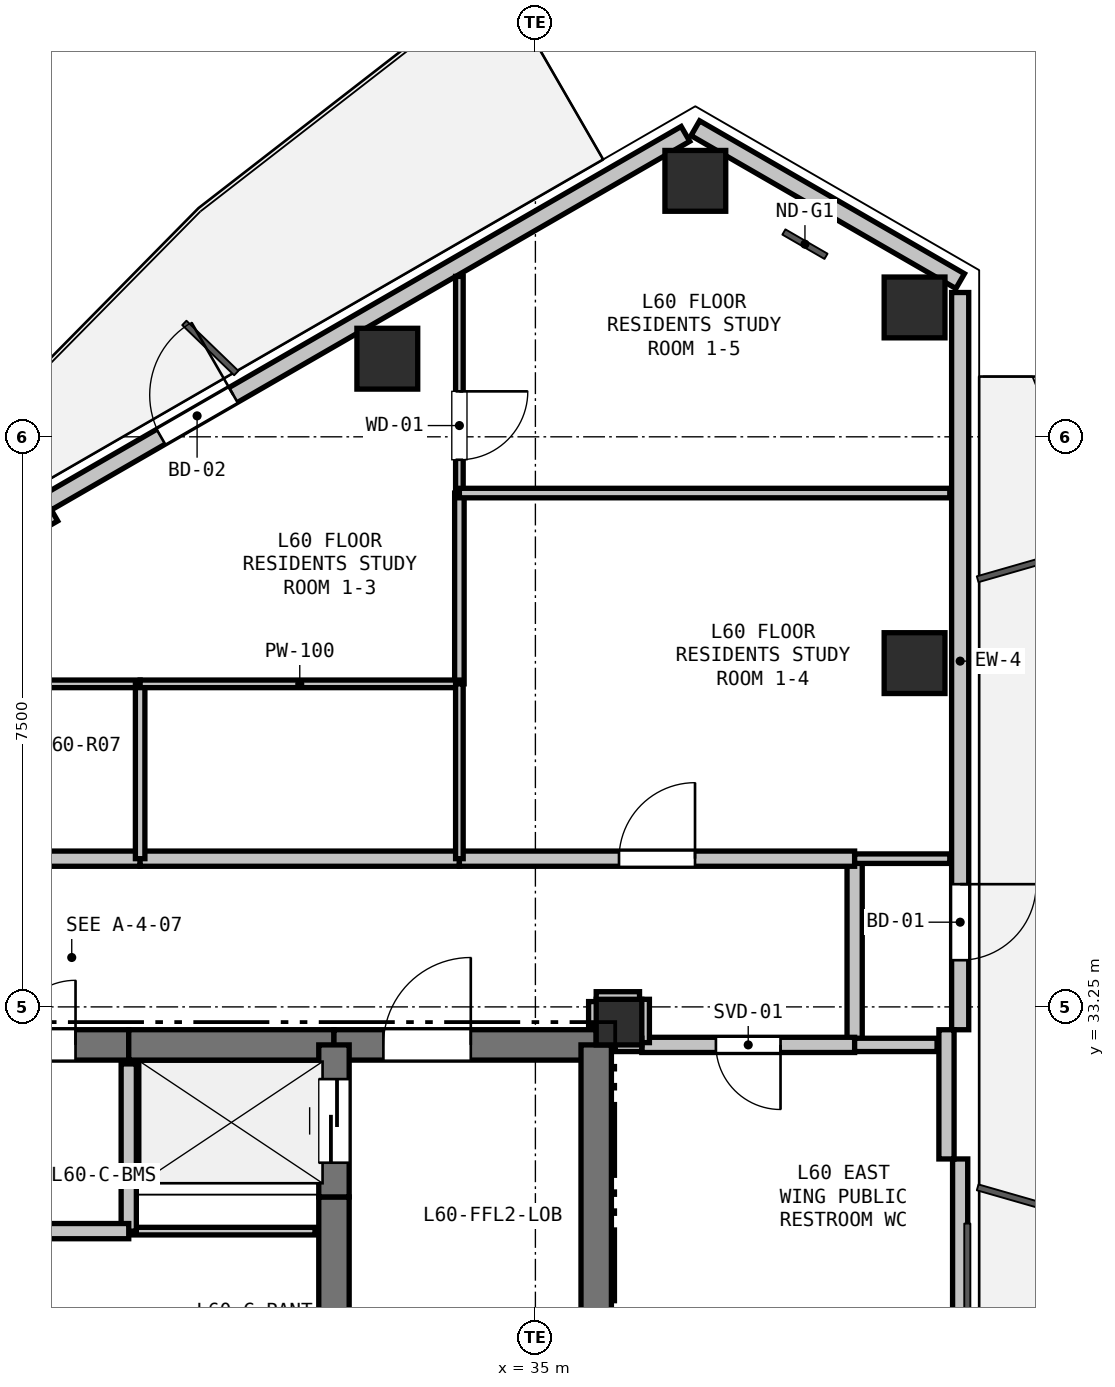
"""IFC4 building model, lengths in metres.
Left out: names, types, materials, properties, quantities, classifications, styles, units other than length and angle.
Written with IfcOpenShell. Run it as: python <this file> out.ifc"""

import sys

from ifc_helpers import new_model, si_unit, direction, frame, frame_2d, origin, origin_2d, place, context, subcontext, project, spatial, rectangle, hollow_rectangle, extrude, element, fill, save


model = new_model("IFC4")
c1 = context("Model", 3, precision=1e-05, world=origin(), true_north=direction((0.0, 1.0)))
c2 = subcontext(c1, "Body", "Model", "MODEL_VIEW")
j1 = project(units=[si_unit("LENGTHUNIT", "METRE"), si_unit("PLANEANGLEUNIT", "RADIAN")], contexts=[c1])
p1 = place(None, origin())
s1 = spatial("IfcSite", under=j1, at=p1, CompositionType="ELEMENT")
p2 = place(p1, origin())
s2 = spatial("IfcBuilding", under=s1, at=p2, CompositionType="ELEMENT")
p3 = place(p2, frame((0.0, 0.0, 215.1)))
s3 = spatial("IfcBuildingStorey", under=s2, at=p3, CompositionType="ELEMENT", Elevation=215.1)
p4 = place(p3, frame((36.1, 33.05, 0.0), z_axis=(0.0, 0.0, 1.0), x_axis=(1.0, 0.0, 0.0)))
e1 = element("IfcColumn", 1, at=p4, inside=s3, PredefinedType="COLUMN", context=c2, shape_type="SweptSolid", body=[
    extrude(rectangle(XDim=0.6, YDim=0.6, at=origin_2d()), origin(), (0.0, 0.0, 1.0), 3.3),
])
for number, where, z_axis, x_axis in (
    (2, (33.052, 41.778, 0.0), (0.0, 0.0, 1.0), (1.0, 0.0, 0.0)),
    (3, (37.104, 44.117, 0.0), (0.0, 0.0, 1.0), (1.0, 0.0, 0.0)),
    (4, (39.988, 42.452, 0.0), (0.0, 0.0, 1.0), (1.0, 0.0, 0.0)),
    (5, (39.988, 37.773, 0.0), (0.0, 0.0, 1.0), (1.0, 0.0, 0.0)),
):
    element("IfcColumn", number, at=place(p3, frame(where, z_axis=z_axis, x_axis=x_axis)), inside=s3, PredefinedType="COLUMN", context=c2, shape_type="SweptSolid", body=[
        extrude(hollow_rectangle(XDim=0.8, YDim=0.8, WallThickness=0.025, at=origin_2d()), origin(), (0.0, 0.0, 1.0), 3.3),
    ])
p5 = place(p3, frame((37.104, 44.81, 0.0), z_axis=(0.0, 0.0, 1.0), x_axis=(0.866023907196, -0.500002592159, 0.0)))
e6 = element("IfcWall", 6, at=p5, inside=s3, PredefinedType="SOLIDWALL", context=c2, shape_type="SweptSolid", body=[
    extrude(rectangle(XDim=4.023, YDim=0.225, at=frame_2d((2.012, 0.0))), origin(), (0.0, 0.0, 1.0), 2.64),
])
p6 = place(p3, frame((28.575, 39.885, 0.0), z_axis=(0.0, 0.0, 1.0), x_axis=(0.866016233231, 0.500015883528, 0.0)))
e7 = element("IfcWall", 7, at=p6, inside=s3, PredefinedType="SOLIDWALL", context=c2, shape_type="SweptSolid", body=[
    extrude(rectangle(XDim=9.699, YDim=0.225, at=frame_2d((4.85, 0.0))), origin(), (0.0, 0.0, 1.0), 2.64),
])
p7 = place(p6, frame((1.73, 0.0, 0.0)))
e8 = element("IfcOpeningElement", 8, at=p7, cuts=e7, PredefinedType="OPENING", context=c2, shape_type="SweptSolid", body=[
    extrude(rectangle(XDim=1.1, YDim=2.1, at=frame_2d((0.55, 1.05))), frame((0.0, 0.123, 0.0), z_axis=(0.0, -1.0, 0.0), x_axis=(1.0, 0.0, 0.0)), (0.0, 0.0, 1.0), 0.245),
])
p8 = place(p3, frame((27.192, 38.88, 0.0), z_axis=(0.0, 0.0, 1.0), x_axis=(0.866025371046, 0.500000056704, 0.0)))
e9 = element("IfcWall", 9, at=p8, inside=s3, PredefinedType="PARAPET", context=c2, shape_type="SweptSolid", body=[
    extrude(rectangle(XDim=1.7, YDim=0.2, at=frame_2d((0.85, 0.0))), origin(), (0.0, 0.0, 1.0), 2.64),
])
p9 = place(p3, frame((40.588, 42.648, 0.0), z_axis=(0.0, 0.0, 1.0), x_axis=(0.0, -1.0, 0.0)))
e10 = element("IfcWall", 10, at=p9, inside=s3, PredefinedType="SOLIDWALL", context=c2, shape_type="SweptSolid", body=[
    extrude(rectangle(XDim=9.699, YDim=0.225, at=frame_2d((4.85, 0.0))), origin(), (0.0, 0.0, 1.0), 2.64),
])
p10 = place(p9, frame((7.784, 0.0, 0.0)))
e11 = element("IfcOpeningElement", 11, at=p10, cuts=e10, PredefinedType="OPENING", context=c2, shape_type="SweptSolid", body=[
    extrude(rectangle(XDim=1.0, YDim=2.1, at=frame_2d((0.5, 1.05))), frame((0.0, 0.123, 0.0), z_axis=(0.0, -1.0, 0.0), x_axis=(1.0, 0.0, 0.0)), (0.0, 0.0, 1.0), 0.245),
])
p11 = place(p3, frame((40.588, 31.25, 0.0), z_axis=(0.0, 0.0, 1.0), x_axis=(0.0, -1.0, 0.0)))
e12 = element("IfcWall", 12, at=p11, inside=s3, PredefinedType="PARAPET", context=c2, shape_type="SweptSolid", body=[
    extrude(rectangle(XDim=8.999, YDim=0.2, at=frame_2d((4.5, 0.0))), origin(), (0.0, 0.0, 1.0), 0.2),
])
p12 = place(p3, frame((40.408, 32.949, 0.0), z_axis=(0.0, 0.0, 1.0), x_axis=(0.0, -1.0, 0.0)))
e13 = element("IfcWall", 13, at=p12, inside=s3, PredefinedType="PARAPET", context=c2, shape_type="SweptSolid", body=[
    extrude(rectangle(XDim=1.7, YDim=0.2, at=frame_2d((0.85, 0.0))), origin(), (0.0, 0.0, 1.0), 2.64),
])
p13 = place(p3, frame((27.4, 32.75, 0.0), z_axis=(0.0, 0.0, 1.0), x_axis=(1.0, 0.0, 0.0)))
e14 = element("IfcWall", 14, at=p13, inside=s3, PredefinedType="SHEAR", context=c2, shape_type="SweptSolid", body=[
    extrude(rectangle(XDim=2.25, YDim=0.4, at=frame_2d((1.125, 0.0))), origin(), (0.0, 0.0, 1.0), 3.02),
])
p14 = place(p13, frame((0.7, 0.0, 0.0)))
e15 = element("IfcOpeningElement", 15, at=p14, cuts=e14, PredefinedType="OPENING", context=c2, shape_type="SweptSolid", body=[
    extrude(rectangle(XDim=0.85, YDim=2.1, at=frame_2d((0.425, 1.05))), frame((0.0, 0.21, 0.0), z_axis=(0.0, -1.0, 0.0), x_axis=(1.0, 0.0, 0.0)), (0.0, 0.0, 1.0), 0.42),
])
p15 = place(p3, frame((29.65, 32.75, 0.0), z_axis=(0.0, 0.0, 1.0), x_axis=(1.0, 0.0, 0.0)))
e16 = element("IfcWall", 16, at=p15, inside=s3, PredefinedType="SHEAR", context=c2, shape_type="SweptSolid", body=[
    extrude(rectangle(XDim=2.7, YDim=0.4, at=frame_2d((1.35, 0.0))), origin(), (0.0, 0.0, 1.0), 3.02),
])
p16 = place(p3, frame((32.35, 32.75, 0.0), z_axis=(0.0, 0.0, 1.0), x_axis=(1.0, 0.0, 0.0)))
e17 = element("IfcWall", 17, at=p16, inside=s3, PredefinedType="SHEAR", context=c2, shape_type="SweptSolid", body=[
    extrude(rectangle(XDim=3.45, YDim=0.4, at=frame_2d((1.725, 0.0))), origin(), (0.0, 0.0, 1.0), 3.02),
])
p17 = place(p16, frame((0.65, 0.0, 0.0)))
e18 = element("IfcOpeningElement", 18, at=p17, cuts=e17, PredefinedType="OPENING", context=c2, shape_type="SweptSolid", body=[
    extrude(rectangle(XDim=1.15, YDim=2.15, at=frame_2d((0.575, 1.075))), frame((0.0, 0.21, 0.0), z_axis=(0.0, -1.0, 0.0), x_axis=(1.0, 0.0, 0.0)), (0.0, 0.0, 1.0), 0.42),
])
p18 = place(p3, frame((35.8, 32.75, 0.0), z_axis=(0.0, 0.0, 1.0), x_axis=(0.0, -1.0, 0.0)))
e19 = element("IfcWall", 19, at=p18, inside=s3, PredefinedType="SHEAR", context=c2, shape_type="SweptSolid", body=[
    extrude(rectangle(XDim=4.65, YDim=0.4, at=frame_2d((2.325, 0.0))), origin(), (0.0, 0.0, 1.0), 3.02),
])
p19 = place(p3, frame((32.35, 27.95, 0.0), z_axis=(0.0, 0.0, 1.0), x_axis=(0.0, 1.0, 0.0)))
e20 = element("IfcWall", 20, at=p19, inside=s3, PredefinedType="SHEAR", context=c2, shape_type="SweptSolid", body=[
    extrude(rectangle(XDim=2.8, YDim=0.4, at=frame_2d((1.4, 0.0))), origin(), (0.0, 0.0, 1.0), 3.02),
])
p20 = place(p3, frame((32.35, 30.75, 0.0), z_axis=(0.0, 0.0, 1.0), x_axis=(0.0, 1.0, 0.0)))
e21 = element("IfcWall", 21, at=p20, inside=s3, PredefinedType="SHEAR", context=c2, shape_type="SweptSolid", body=[
    extrude(rectangle(XDim=2.0, YDim=0.4, at=frame_2d((1.0, 0.0))), origin(), (0.0, 0.0, 1.0), 3.02),
])
p21 = place(p20, frame((0.45, 0.0, 0.0)))
e22 = element("IfcOpeningElement", 22, at=p21, cuts=e21, PredefinedType="OPENING", context=c2, shape_type="SweptSolid", body=[
    extrude(rectangle(XDim=1.1, YDim=2.15, at=frame_2d((0.55, 1.075))), frame((0.0, 0.21, 0.0), z_axis=(0.0, -1.0, 0.0), x_axis=(1.0, 0.0, 0.0)), (0.0, 0.0, 1.0), 0.42),
])
p22 = place(p3, frame((32.1, 30.3, 0.0), z_axis=(0.0, 0.0, 1.0), x_axis=(-1.0, 0.0, 0.0)))
e23 = element("IfcWall", 23, at=p22, inside=s3, PredefinedType="PARTITIONING", context=c2, shape_type="SweptSolid", body=[
    extrude(rectangle(XDim=2.45, YDim=0.1, at=frame_2d((1.225, 0.0))), origin(), (0.0, 0.0, 1.0), 3.02),
])
p23 = place(p3, frame((29.65, 30.3, 0.0), z_axis=(0.0, 0.0, 1.0), x_axis=(0.0, 1.0, 0.0)))
e24 = element("IfcWall", 24, at=p23, inside=s3, PredefinedType="PARTITIONING", context=c2, shape_type="SweptSolid", body=[
    extrude(rectangle(XDim=2.2, YDim=0.2, at=frame_2d((1.1, 0.0))), origin(), (0.0, 0.0, 1.0), 3.02),
])
p24 = place(p3, frame((39.2, 35.2, 0.0), z_axis=(0.0, 0.0, 1.0), x_axis=(0.0, -1.0, 0.0)))
e25 = element("IfcWall", 25, at=p24, inside=s3, PredefinedType="PARTITIONING", context=c2, shape_type="SweptSolid", body=[
    extrude(rectangle(XDim=2.45, YDim=0.2, at=frame_2d((1.225, 0.0))), origin(), (0.0, 0.0, 1.0), 3.02),
])
p25 = place(p3, frame((39.2, 32.75, 0.0), z_axis=(0.0, 0.0, 1.0), x_axis=(-1.0, 0.0, 0.0)))
e26 = element("IfcWall", 26, at=p25, inside=s3, PredefinedType="PARTITIONING", context=c2, shape_type="SweptSolid", body=[
    extrude(rectangle(XDim=2.8, YDim=0.2, at=frame_2d((1.4, 0.0))), origin(), (0.0, 0.0, 1.0), 3.02),
])
p26 = place(p25, frame((0.975, 0.0, 0.0)))
e27 = element("IfcOpeningElement", 27, at=p26, cuts=e26, PredefinedType="OPENING", context=c2, shape_type="SweptSolid", body=[
    extrude(rectangle(XDim=0.85, YDim=2.1, at=frame_2d((0.425, 1.05))), frame((0.0, 0.11, 0.0), z_axis=(0.0, -1.0, 0.0), x_axis=(1.0, 0.0, 0.0)), (0.0, 0.0, 1.0), 0.22),
])
for number, where, z_axis, x_axis in (
    (28, (36.4, 32.78, 0.0), (0.0, 0.0, 1.0), (0.0, 1.0, 0.0)),
    (29, (36.37, 33.35, 0.0), (0.0, 0.0, 1.0), (-1.0, 0.0, 0.0)),
):
    element("IfcWall", number, at=place(p3, frame(where, z_axis=z_axis, x_axis=x_axis)), inside=s3, PredefinedType="PARTITIONING", context=c2, shape_type="SweptSolid", body=[
        extrude(rectangle(XDim=0.57, YDim=0.2, at=frame_2d((0.285, 0.0))), origin(), (0.0, 0.0, 1.0), 2.468),
    ])
p27 = place(p3, frame((35.8, 33.32, 0.0), z_axis=(0.0, 0.0, 1.0), x_axis=(0.0, -1.0, 0.0)))
e30 = element("IfcWall", 30, at=p27, inside=s3, PredefinedType="PARTITIONING", context=c2, shape_type="SweptSolid", body=[
    extrude(rectangle(XDim=0.32, YDim=0.2, at=frame_2d((0.16, 0.0))), origin(), (0.0, 0.0, 1.0), 2.545),
])
p28 = place(p3, frame((26.2, 35.2, 0.0), z_axis=(0.0, 0.0, 1.0), x_axis=(1.0, 0.0, 0.0)))
e31 = element("IfcWall", 31, at=p28, inside=s3, PredefinedType="PARTITIONING", context=c2, shape_type="SweptSolid", body=[
    extrude(rectangle(XDim=3.6, YDim=0.2, at=frame_2d((1.8, 0.0))), origin(), (0.0, 0.0, 1.0), 3.02),
])
p29 = place(p28, frame((1.3, 0.0, 0.0)))
e32 = element("IfcOpeningElement", 32, at=p29, cuts=e31, PredefinedType="OPENING", context=c2, shape_type="SweptSolid", body=[
    extrude(rectangle(XDim=1.0, YDim=2.15, at=frame_2d((0.5, 1.075))), frame((0.0, 0.11, 0.0), z_axis=(0.0, -1.0, 0.0), x_axis=(1.0, 0.0, 0.0)), (0.0, 0.0, 1.0), 0.22),
])
p30 = place(p3, frame((29.8, 35.2, 0.0), z_axis=(0.0, 0.0, 1.0), x_axis=(1.0, 0.0, 0.0)))
e33 = element("IfcWall", 33, at=p30, inside=s3, PredefinedType="PARTITIONING", context=c2, shape_type="SweptSolid", body=[
    extrude(rectangle(XDim=4.2, YDim=0.2, at=frame_2d((2.1, 0.0))), origin(), (0.0, 0.0, 1.0), 3.02),
])
p31 = place(p3, frame((34.0, 35.2, 0.0), z_axis=(0.0, 0.0, 1.0), x_axis=(1.0, 0.0, 0.0)))
e34 = element("IfcWall", 34, at=p31, inside=s3, PredefinedType="PARTITIONING", context=c2, shape_type="SweptSolid", body=[
    extrude(rectangle(XDim=5.2, YDim=0.2, at=frame_2d((2.6, 0.0))), origin(), (0.0, 0.0, 1.0), 2.468),
])
p32 = place(p31, frame((2.1, 0.0, 0.0)))
e35 = element("IfcOpeningElement", 35, at=p32, cuts=e34, PredefinedType="OPENING", context=c2, shape_type="SweptSolid", body=[
    extrude(rectangle(XDim=1.0, YDim=2.15, at=frame_2d((0.5, 1.075))), frame((0.0, 0.11, 0.0), z_axis=(0.0, -1.0, 0.0), x_axis=(1.0, 0.0, 0.0)), (0.0, 0.0, 1.0), 0.22),
])
p33 = place(p3, frame((36.05, 32.75, 0.0), z_axis=(0.0, 0.0, 1.0), x_axis=(1.0, 0.0, 0.0)))
e36 = element("IfcWall", 36, at=p33, inside=s3, PredefinedType="PLUMBINGWALL", context=c2, shape_type="SweptSolid", body=[
    extrude(rectangle(XDim=0.35, YDim=0.175, at=frame_2d((0.175, 0.0))), origin(), (0.0, 0.0, 1.0), 2.545),
])
p34 = place(p3, frame((39.2, 32.75, 0.0), z_axis=(0.0, 0.0, 1.0), x_axis=(1.0, 0.0, 0.0)))
e37 = element("IfcWall", 37, at=p34, inside=s3, PredefinedType="PLUMBINGWALL", context=c2, shape_type="SweptSolid", body=[
    extrude(rectangle(XDim=1.084, YDim=0.175, at=frame_2d((0.542, 0.0))), origin(), (0.0, 0.0, 1.0), 2.365),
])
p35 = place(p3, frame((27.4, 30.3, 0.0), z_axis=(0.0, 0.0, 1.0), x_axis=(1.0, 0.0, 0.0)))
e38 = element("IfcWall", 38, at=p35, inside=s3, PredefinedType="PARTITIONING", context=c2, shape_type="SweptSolid", body=[
    extrude(rectangle(XDim=2.25, YDim=0.2, at=frame_2d((1.125, 0.0))), origin(), (0.0, 0.0, 1.0), 3.02),
])
p36 = place(p3, frame((26.2, 37.5, 0.0), z_axis=(0.0, 0.0, 1.0), x_axis=(1.0, 0.0, 0.0)))
e39 = element("IfcWall", 39, at=p36, inside=s3, PredefinedType="PARTITIONING", context=c2, shape_type="SweptSolid", body=[
    extrude(rectangle(XDim=3.6, YDim=0.1, at=frame_2d((1.8, 0.0))), origin(), (0.0, 0.0, 1.0), 3.02),
])
p37 = place(p3, frame((29.8, 37.5, 0.0), z_axis=(0.0, 0.0, 1.0), x_axis=(0.0, -1.0, 0.0)))
e40 = element("IfcWall", 40, at=p37, inside=s3, PredefinedType="PARTITIONING", context=c2, shape_type="SweptSolid", body=[
    extrude(rectangle(XDim=2.3, YDim=0.125, at=frame_2d((1.15, 0.0))), origin(), (0.0, 0.0, 1.0), 3.02),
])
p38 = place(p3, frame((34.0, 42.86, 0.0), z_axis=(0.0, 0.0, 1.0), x_axis=(0.0, -1.0, 0.0)))
e41 = element("IfcWall", 41, at=p38, inside=s3, PredefinedType="PARTITIONING", context=c2, shape_type="SweptSolid", body=[
    extrude(rectangle(XDim=2.85, YDim=0.1, at=frame_2d((1.425, 0.0))), origin(), (0.0, 0.0, 1.0), 2.745),
])
p39 = place(p38, frame((1.512, 0.0, 0.0)))
e42 = element("IfcOpeningElement", 42, at=p39, cuts=e41, PredefinedType="OPENING", context=c2, shape_type="SweptSolid", body=[
    extrude(rectangle(XDim=0.9, YDim=2.1, at=frame_2d((0.45, 1.05))), frame((0.0, 0.06, 0.0), z_axis=(0.0, -1.0, 0.0), x_axis=(1.0, 0.0, 0.0)), (0.0, 0.0, 1.0), 0.12),
])
p40 = place(p3, frame((34.0, 40.01, 0.0), z_axis=(0.0, 0.0, 1.0), x_axis=(0.0, -1.0, 0.0)))
e43 = element("IfcWall", 43, at=p40, inside=s3, PredefinedType="PARTITIONING", context=c2, shape_type="SweptSolid", body=[
    extrude(rectangle(XDim=2.51, YDim=0.125, at=frame_2d((1.255, 0.0))), origin(), (0.0, 0.0, 1.0), 3.02),
])
p41 = place(p3, frame((34.0, 37.5, 0.0), z_axis=(0.0, 0.0, 1.0), x_axis=(-1.0, 0.0, 0.0)))
e44 = element("IfcWall", 44, at=p41, inside=s3, PredefinedType="PARTITIONING", context=c2, shape_type="SweptSolid", body=[
    extrude(rectangle(XDim=4.2, YDim=0.1, at=frame_2d((2.1, 0.0))), origin(), (0.0, 0.0, 1.0), 3.02),
])
p42 = place(p3, frame((40.452, 35.2, 0.0), z_axis=(0.0, 0.0, 1.0), x_axis=(-1.0, 0.0, 0.0)))
e45 = element("IfcWall", 45, at=p42, inside=s3, PredefinedType="PARTITIONING", context=c2, shape_type="SweptSolid", body=[
    extrude(rectangle(XDim=1.252, YDim=0.125, at=frame_2d((0.626, 0.0))), origin(), (0.0, 0.0, 1.0), 2.365),
])
p43 = place(p3, frame((34.0, 35.2, 0.0), z_axis=(0.0, 0.0, 1.0), x_axis=(0.0, 1.0, 0.0)))
e46 = element("IfcWall", 46, at=p43, inside=s3, PredefinedType="PARTITIONING", context=c2, shape_type="SweptSolid", body=[
    extrude(rectangle(XDim=2.3, YDim=0.1, at=frame_2d((1.15, 0.0))), origin(), (0.0, 0.0, 1.0), 3.02),
])
p44 = place(p3, frame((34.0, 40.01, 0.0), z_axis=(0.0, 0.0, 1.0), x_axis=(1.0, 0.0, 0.0)))
e47 = element("IfcWall", 47, at=p44, inside=s3, PredefinedType="PARTITIONING", context=c2, shape_type="SweptSolid", body=[
    extrude(rectangle(XDim=6.452, YDim=0.125, at=frame_2d((3.226, 0.0))), origin(), (0.0, 0.0, 1.0), 2.468),
])
p45 = place(p7, origin())
e48 = element("IfcDoor", 48, at=p45, inside=s3, OperationType="SINGLE_SWING_RIGHT", PredefinedType="DOOR", context=c2, shape_type="SweptSolid", body=[
    extrude(rectangle(XDim=1.1, YDim=2.1, at=frame_2d((0.55, 1.05))), frame((0.0, 0.025, 0.0), z_axis=(0.0, -1.0, 0.0), x_axis=(1.0, 0.0, 0.0)), (0.0, 0.0, 1.0), 0.05),
])
fill(e8, e48)
p46 = place(p10, origin())
e49 = element("IfcDoor", 49, at=p46, inside=s3, OperationType="SINGLE_SWING_LEFT", PredefinedType="DOOR", context=c2, shape_type="SweptSolid", body=[
    extrude(rectangle(XDim=1.0, YDim=2.1, at=frame_2d((0.5, 1.05))), frame((0.0, 0.025, 0.0), z_axis=(0.0, -1.0, 0.0), x_axis=(1.0, 0.0, 0.0)), (0.0, 0.0, 1.0), 0.05),
])
fill(e11, e49)
p47 = place(p21, origin())
e50 = element("IfcDoor", 50, at=p47, inside=s3, OperationType="SLIDING_TO_LEFT", PredefinedType="DOOR", context=c2, shape_type="SweptSolid", body=[
    extrude(rectangle(XDim=1.1, YDim=2.15, at=frame_2d((0.55, 1.075))), frame((0.0, 0.025, 0.0), z_axis=(0.0, -1.0, 0.0), x_axis=(1.0, 0.0, 0.0)), (0.0, 0.0, 1.0), 0.05),
])
fill(e22, e50)
p48 = place(p17, origin())
e51 = element("IfcDoor", 51, at=p48, inside=s3, OperationType="SINGLE_SWING_RIGHT", PredefinedType="DOOR", context=c2, shape_type="SweptSolid", body=[
    extrude(rectangle(XDim=1.15, YDim=2.15, at=frame_2d((0.575, 1.075))), frame((0.0, 0.025, 0.0), z_axis=(0.0, -1.0, 0.0), x_axis=(1.0, 0.0, 0.0)), (0.0, 0.0, 1.0), 0.05),
])
fill(e18, e51)
p49 = place(p26, origin())
e52 = element("IfcDoor", 52, at=p49, inside=s3, OperationType="SINGLE_SWING_LEFT", PredefinedType="DOOR", context=c2, shape_type="SweptSolid", body=[
    extrude(rectangle(XDim=0.85, YDim=2.1, at=frame_2d((0.425, 1.05))), frame((0.0, 0.025, 0.0), z_axis=(0.0, -1.0, 0.0), x_axis=(1.0, 0.0, 0.0)), (0.0, 0.0, 1.0), 0.05),
])
fill(e27, e52)
p50 = place(p14, origin())
e53 = element("IfcDoor", 53, at=p50, inside=s3, OperationType="SINGLE_SWING_RIGHT", PredefinedType="DOOR", context=c2, shape_type="SweptSolid", body=[
    extrude(rectangle(XDim=0.85, YDim=2.1, at=frame_2d((0.425, 1.05))), frame((0.0, 0.025, 0.0), z_axis=(0.0, -1.0, 0.0), x_axis=(1.0, 0.0, 0.0)), (0.0, 0.0, 1.0), 0.05),
])
fill(e15, e53)
p51 = place(p32, origin())
e54 = element("IfcDoor", 54, at=p51, inside=s3, OperationType="SINGLE_SWING_RIGHT", PredefinedType="DOOR", context=c2, shape_type="SweptSolid", body=[
    extrude(rectangle(XDim=1.0, YDim=2.15, at=frame_2d((0.5, 1.075))), frame((0.0, 0.025, 0.0), z_axis=(0.0, -1.0, 0.0), x_axis=(1.0, 0.0, 0.0)), (0.0, 0.0, 1.0), 0.05),
])
fill(e35, e54)
p52 = place(p39, origin())
e55 = element("IfcDoor", 55, at=p52, inside=s3, OperationType="SINGLE_SWING_LEFT", PredefinedType="DOOR", context=c2, shape_type="SweptSolid", body=[
    extrude(rectangle(XDim=0.9, YDim=2.1, at=frame_2d((0.45, 1.05))), frame((0.0, 0.025, 0.0), z_axis=(0.0, -1.0, 0.0), x_axis=(1.0, 0.0, 0.0)), (0.0, 0.0, 1.0), 0.05),
])
fill(e42, e55)
save(model, sys.argv[1])
